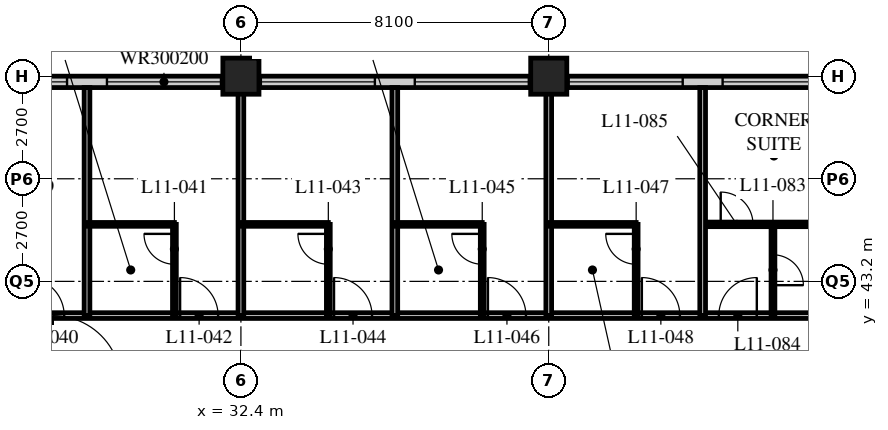
"""IFC4 building model, lengths in metres.
Left out: names, types, materials, properties, quantities, classifications, styles, units other than length and angle.
Written with IfcOpenShell. Run it as: python <this file> out.ifc"""

import sys

from ifc_helpers import new_model, si_unit, direction, frame, frame_2d, origin, origin_2d, place, context, subcontext, project, spatial, rectangle, hollow_rectangle, extrude, element, fill, save


model = new_model("IFC4")
c1 = context("Model", 3, precision=1e-05, world=origin(), true_north=direction((0.0, 1.0)))
c2 = subcontext(c1, "Body", "Model", "MODEL_VIEW")
j1 = project(units=[si_unit("LENGTHUNIT", "METRE"), si_unit("PLANEANGLEUNIT", "RADIAN")], contexts=[c1])
p1 = place(None, origin())
s1 = spatial("IfcSite", under=j1, at=p1, CompositionType="ELEMENT")
p2 = place(p1, origin())
s2 = spatial("IfcBuilding", under=s1, at=p2, CompositionType="ELEMENT")
p3 = place(p2, frame((0.0, 0.0, 50.0)))
s3 = spatial("IfcBuildingStorey", under=s2, at=p3, CompositionType="ELEMENT", Elevation=50.0)
for number, where, z_axis, x_axis in (
    (1, (32.4, 48.6, 0.0), (0.0, 0.0, 1.0), (1.0, 0.0, 0.0)),
    (2, (40.5, 48.6, 0.0), (0.0, 0.0, 1.0), (1.0, 0.0, 0.0)),
):
    element("IfcColumn", number, at=place(p3, frame(where, z_axis=z_axis, x_axis=x_axis)), inside=s3, PredefinedType="COLUMN", context=c2, shape_type="SweptSolid", body=[
        extrude(hollow_rectangle(XDim=0.95, YDim=0.95, WallThickness=0.095, at=origin_2d()), origin(), (0.0, 0.0, 1.0), 3.4),
    ])
p4 = place(p3, frame((48.3, 48.45, 0.0), z_axis=(0.0, 0.0, 1.0), x_axis=(-1.0, 0.0, 0.0)))
e3 = element("IfcWall", 3, at=p4, inside=s3, PredefinedType="SOLIDWALL", context=c2, shape_type="SweptSolid", body=[
    extrude(rectangle(XDim=40.2, YDim=0.3, at=frame_2d((20.1, 0.0))), origin(), (0.0, 0.0, 1.0), 3.19),
])
p5 = place(p4, frame((0.225, 0.0, 0.9)))
e4 = element("IfcOpeningElement", 4, at=p5, cuts=e3, PredefinedType="OPENING", context=c2, shape_type="SweptSolid", body=[
    extrude(rectangle(XDim=3.0, YDim=2.0, at=frame_2d((1.5, 1.0))), frame((0.0, 0.16, 0.0), z_axis=(0.0, -1.0, 0.0), x_axis=(1.0, 0.0, 0.0)), (0.0, 0.0, 1.0), 0.32),
])
p6 = place(p4, frame((4.275, 0.0, 0.9)))
e5 = element("IfcOpeningElement", 5, at=p6, cuts=e3, PredefinedType="OPENING", context=c2, shape_type="SweptSolid", body=[
    extrude(rectangle(XDim=3.0, YDim=2.0, at=frame_2d((1.5, 1.0))), frame((0.0, 0.16, 0.0), z_axis=(0.0, -1.0, 0.0), x_axis=(1.0, 0.0, 0.0)), (0.0, 0.0, 1.0), 0.32),
])
p7 = place(p4, frame((8.325, 0.0, 0.9)))
e6 = element("IfcOpeningElement", 6, at=p7, cuts=e3, PredefinedType="OPENING", context=c2, shape_type="SweptSolid", body=[
    extrude(rectangle(XDim=3.0, YDim=2.0, at=frame_2d((1.5, 1.0))), frame((0.0, 0.16, 0.0), z_axis=(0.0, -1.0, 0.0), x_axis=(1.0, 0.0, 0.0)), (0.0, 0.0, 1.0), 0.32),
])
p8 = place(p4, frame((12.375, 0.0, 0.9)))
e7 = element("IfcOpeningElement", 7, at=p8, cuts=e3, PredefinedType="OPENING", context=c2, shape_type="SweptSolid", body=[
    extrude(rectangle(XDim=3.0, YDim=2.0, at=frame_2d((1.5, 1.0))), frame((0.0, 0.16, 0.0), z_axis=(0.0, -1.0, 0.0), x_axis=(1.0, 0.0, 0.0)), (0.0, 0.0, 1.0), 0.32),
])
p9 = place(p4, frame((16.425, 0.0, 0.9)))
e8 = element("IfcOpeningElement", 8, at=p9, cuts=e3, PredefinedType="OPENING", context=c2, shape_type="SweptSolid", body=[
    extrude(rectangle(XDim=3.0, YDim=2.0, at=frame_2d((1.5, 1.0))), frame((0.0, 0.16, 0.0), z_axis=(0.0, -1.0, 0.0), x_axis=(1.0, 0.0, 0.0)), (0.0, 0.0, 1.0), 0.32),
])
p10 = place(p4, frame((20.475, 0.0, 0.9)))
e9 = element("IfcOpeningElement", 9, at=p10, cuts=e3, PredefinedType="OPENING", context=c2, shape_type="SweptSolid", body=[
    extrude(rectangle(XDim=3.0, YDim=2.0, at=frame_2d((1.5, 1.0))), frame((0.0, 0.16, 0.0), z_axis=(0.0, -1.0, 0.0), x_axis=(1.0, 0.0, 0.0)), (0.0, 0.0, 1.0), 0.32),
])
p11 = place(p4, frame((24.525, 0.0, 0.9)))
e10 = element("IfcOpeningElement", 10, at=p11, cuts=e3, PredefinedType="OPENING", context=c2, shape_type="SweptSolid", body=[
    extrude(rectangle(XDim=3.0, YDim=2.0, at=frame_2d((1.5, 1.0))), frame((0.0, 0.16, 0.0), z_axis=(0.0, -1.0, 0.0), x_axis=(1.0, 0.0, 0.0)), (0.0, 0.0, 1.0), 0.32),
])
p12 = place(p4, frame((28.575, 0.0, 0.9)))
e11 = element("IfcOpeningElement", 11, at=p12, cuts=e3, PredefinedType="OPENING", context=c2, shape_type="SweptSolid", body=[
    extrude(rectangle(XDim=3.0, YDim=2.0, at=frame_2d((1.5, 1.0))), frame((0.0, 0.16, 0.0), z_axis=(0.0, -1.0, 0.0), x_axis=(1.0, 0.0, 0.0)), (0.0, 0.0, 1.0), 0.32),
])
p13 = place(p4, frame((32.625, 0.0, 0.9)))
e12 = element("IfcOpeningElement", 12, at=p13, cuts=e3, PredefinedType="OPENING", context=c2, shape_type="SweptSolid", body=[
    extrude(rectangle(XDim=3.0, YDim=2.0, at=frame_2d((1.5, 1.0))), frame((0.0, 0.16, 0.0), z_axis=(0.0, -1.0, 0.0), x_axis=(1.0, 0.0, 0.0)), (0.0, 0.0, 1.0), 0.32),
])
p14 = place(p4, frame((36.675, 0.0, 0.9)))
e13 = element("IfcOpeningElement", 13, at=p14, cuts=e3, PredefinedType="OPENING", context=c2, shape_type="SweptSolid", body=[
    extrude(rectangle(XDim=3.0, YDim=2.0, at=frame_2d((1.5, 1.0))), frame((0.0, 0.16, 0.0), z_axis=(0.0, -1.0, 0.0), x_axis=(1.0, 0.0, 0.0)), (0.0, 0.0, 1.0), 0.32),
])
p15 = place(p3, frame((8.1, 42.3, 0.0), z_axis=(0.0, 0.0, 1.0), x_axis=(1.0, 0.0, 0.0)))
e14 = element("IfcWall", 14, at=p15, inside=s3, PredefinedType="PARTITIONING", context=c2, shape_type="SweptSolid", body=[
    extrude(rectangle(XDim=40.5, YDim=0.15, at=frame_2d((20.25, 0.0))), origin(), (0.0, 0.0, 1.0), 3.19),
])
p16 = place(p15, frame((6.5, 0.0, 0.0)))
e15 = element("IfcOpeningElement", 15, at=p16, cuts=e14, PredefinedType="OPENING", context=c2, shape_type="SweptSolid", body=[
    extrude(rectangle(XDim=1.0, YDim=2.1, at=frame_2d((0.5, 1.05))), frame((0.0, 0.085, 0.0), z_axis=(0.0, -1.0, 0.0), x_axis=(1.0, 0.0, 0.0)), (0.0, 0.0, 1.0), 0.17),
])
p17 = place(p15, frame((10.55, 0.0, 0.0)))
e16 = element("IfcOpeningElement", 16, at=p17, cuts=e14, PredefinedType="OPENING", context=c2, shape_type="SweptSolid", body=[
    extrude(rectangle(XDim=1.0, YDim=2.1, at=frame_2d((0.5, 1.05))), frame((0.0, 0.085, 0.0), z_axis=(0.0, -1.0, 0.0), x_axis=(1.0, 0.0, 0.0)), (0.0, 0.0, 1.0), 0.17),
])
p18 = place(p15, frame((14.6, 0.0, 0.0)))
e17 = element("IfcOpeningElement", 17, at=p18, cuts=e14, PredefinedType="OPENING", context=c2, shape_type="SweptSolid", body=[
    extrude(rectangle(XDim=1.0, YDim=2.1, at=frame_2d((0.5, 1.05))), frame((0.0, 0.085, 0.0), z_axis=(0.0, -1.0, 0.0), x_axis=(1.0, 0.0, 0.0)), (0.0, 0.0, 1.0), 0.17),
])
p19 = place(p15, frame((18.65, 0.0, 0.0)))
e18 = element("IfcOpeningElement", 18, at=p19, cuts=e14, PredefinedType="OPENING", context=c2, shape_type="SweptSolid", body=[
    extrude(rectangle(XDim=1.0, YDim=2.1, at=frame_2d((0.5, 1.05))), frame((0.0, 0.085, 0.0), z_axis=(0.0, -1.0, 0.0), x_axis=(1.0, 0.0, 0.0)), (0.0, 0.0, 1.0), 0.17),
])
p20 = place(p15, frame((22.7, 0.0, 0.0)))
e19 = element("IfcOpeningElement", 19, at=p20, cuts=e14, PredefinedType="OPENING", context=c2, shape_type="SweptSolid", body=[
    extrude(rectangle(XDim=1.0, YDim=2.1, at=frame_2d((0.5, 1.05))), frame((0.0, 0.085, 0.0), z_axis=(0.0, -1.0, 0.0), x_axis=(1.0, 0.0, 0.0)), (0.0, 0.0, 1.0), 0.17),
])
p21 = place(p15, frame((26.75, 0.0, 0.0)))
e20 = element("IfcOpeningElement", 20, at=p21, cuts=e14, PredefinedType="OPENING", context=c2, shape_type="SweptSolid", body=[
    extrude(rectangle(XDim=1.0, YDim=2.1, at=frame_2d((0.5, 1.05))), frame((0.0, 0.085, 0.0), z_axis=(0.0, -1.0, 0.0), x_axis=(1.0, 0.0, 0.0)), (0.0, 0.0, 1.0), 0.17),
])
p22 = place(p15, frame((30.8, 0.0, 0.0)))
e21 = element("IfcOpeningElement", 21, at=p22, cuts=e14, PredefinedType="OPENING", context=c2, shape_type="SweptSolid", body=[
    extrude(rectangle(XDim=1.0, YDim=2.1, at=frame_2d((0.5, 1.05))), frame((0.0, 0.085, 0.0), z_axis=(0.0, -1.0, 0.0), x_axis=(1.0, 0.0, 0.0)), (0.0, 0.0, 1.0), 0.17),
])
p23 = place(p15, frame((34.85, 0.0, 0.0)))
e22 = element("IfcOpeningElement", 22, at=p23, cuts=e14, PredefinedType="OPENING", context=c2, shape_type="SweptSolid", body=[
    extrude(rectangle(XDim=1.0, YDim=2.1, at=frame_2d((0.5, 1.05))), frame((0.0, 0.085, 0.0), z_axis=(0.0, -1.0, 0.0), x_axis=(1.0, 0.0, 0.0)), (0.0, 0.0, 1.0), 0.17),
])
p24 = place(p15, frame((36.875, 0.0, 0.0)))
e23 = element("IfcOpeningElement", 23, at=p24, cuts=e14, PredefinedType="OPENING", context=c2, shape_type="SweptSolid", body=[
    extrude(rectangle(XDim=1.0, YDim=2.1, at=frame_2d((0.5, 1.05))), frame((0.0, 0.085, 0.0), z_axis=(0.0, -1.0, 0.0), x_axis=(1.0, 0.0, 0.0)), (0.0, 0.0, 1.0), 0.17),
])
p25 = place(p15, frame((2.625, 0.0, 0.0)))
e24 = element("IfcOpeningElement", 24, at=p25, cuts=e14, PredefinedType="OPENING", context=c2, shape_type="SweptSolid", body=[
    extrude(rectangle(XDim=1.0, YDim=2.1, at=frame_2d((0.5, 1.05))), frame((0.0, 0.085, 0.0), z_axis=(0.0, -1.0, 0.0), x_axis=(1.0, 0.0, 0.0)), (0.0, 0.0, 1.0), 0.17),
])
p26 = place(p3, frame((28.35, 42.3, 0.0), z_axis=(0.0, 0.0, 1.0), x_axis=(0.0, 1.0, 0.0)))
e25 = element("IfcWall", 25, at=p26, inside=s3, PredefinedType="PARTITIONING", context=c2, shape_type="SweptSolid", body=[
    extrude(rectangle(XDim=6.0, YDim=0.15, at=frame_2d((3.0, 0.0))), origin(), (0.0, 0.0, 1.0), 3.19),
])
p27 = place(p3, frame((28.35, 44.7, 0.0), z_axis=(0.0, 0.0, 1.0), x_axis=(1.0, 0.0, 0.0)))
e26 = element("IfcWall", 26, at=p27, inside=s3, PredefinedType="PARTITIONING", context=c2, shape_type="SweptSolid", body=[
    extrude(rectangle(XDim=2.3, YDim=0.1, at=frame_2d((1.15, 0.0))), origin(), (0.0, 0.0, 1.0), 3.19),
])
p28 = place(p3, frame((30.65, 42.3, 0.0), z_axis=(0.0, 0.0, 1.0), x_axis=(0.0, 1.0, 0.0)))
e27 = element("IfcWall", 27, at=p28, inside=s3, PredefinedType="PARTITIONING", context=c2, shape_type="SweptSolid", body=[
    extrude(rectangle(XDim=2.4, YDim=0.1, at=frame_2d((1.2, 0.0))), origin(), (0.0, 0.0, 1.0), 3.19),
])
p29 = place(p28, frame((1.35, 0.0, 0.0)))
e28 = element("IfcOpeningElement", 28, at=p29, cuts=e27, PredefinedType="OPENING", context=c2, shape_type="SweptSolid", body=[
    extrude(rectangle(XDim=0.8, YDim=2.1, at=frame_2d((0.4, 1.05))), frame((0.0, 0.06, 0.0), z_axis=(0.0, -1.0, 0.0), x_axis=(1.0, 0.0, 0.0)), (0.0, 0.0, 1.0), 0.12),
])
p30 = place(p3, frame((32.4, 42.3, 0.0), z_axis=(0.0, 0.0, 1.0), x_axis=(0.0, 1.0, 0.0)))
e29 = element("IfcWall", 29, at=p30, inside=s3, PredefinedType="PARTITIONING", context=c2, shape_type="SweptSolid", body=[
    extrude(rectangle(XDim=6.0, YDim=0.15, at=frame_2d((3.0, 0.0))), origin(), (0.0, 0.0, 1.0), 2.578),
])
p31 = place(p3, frame((32.4, 44.7, 0.0), z_axis=(0.0, 0.0, 1.0), x_axis=(1.0, 0.0, 0.0)))
e30 = element("IfcWall", 30, at=p31, inside=s3, PredefinedType="PARTITIONING", context=c2, shape_type="SweptSolid", body=[
    extrude(rectangle(XDim=2.3, YDim=0.1, at=frame_2d((1.15, 0.0))), origin(), (0.0, 0.0, 1.0), 3.19),
])
p32 = place(p3, frame((34.7, 42.3, 0.0), z_axis=(0.0, 0.0, 1.0), x_axis=(0.0, 1.0, 0.0)))
e31 = element("IfcWall", 31, at=p32, inside=s3, PredefinedType="PARTITIONING", context=c2, shape_type="SweptSolid", body=[
    extrude(rectangle(XDim=2.4, YDim=0.1, at=frame_2d((1.2, 0.0))), origin(), (0.0, 0.0, 1.0), 3.19),
])
p33 = place(p32, frame((1.35, 0.0, 0.0)))
e32 = element("IfcOpeningElement", 32, at=p33, cuts=e31, PredefinedType="OPENING", context=c2, shape_type="SweptSolid", body=[
    extrude(rectangle(XDim=0.8, YDim=2.1, at=frame_2d((0.4, 1.05))), frame((0.0, 0.06, 0.0), z_axis=(0.0, -1.0, 0.0), x_axis=(1.0, 0.0, 0.0)), (0.0, 0.0, 1.0), 0.12),
])
p34 = place(p3, frame((36.45, 42.3, 0.0), z_axis=(0.0, 0.0, 1.0), x_axis=(0.0, 1.0, 0.0)))
e33 = element("IfcWall", 33, at=p34, inside=s3, PredefinedType="PARTITIONING", context=c2, shape_type="SweptSolid", body=[
    extrude(rectangle(XDim=6.0, YDim=0.15, at=frame_2d((3.0, 0.0))), origin(), (0.0, 0.0, 1.0), 3.19),
])
p35 = place(p3, frame((36.45, 44.7, 0.0), z_axis=(0.0, 0.0, 1.0), x_axis=(1.0, 0.0, 0.0)))
e34 = element("IfcWall", 34, at=p35, inside=s3, PredefinedType="PARTITIONING", context=c2, shape_type="SweptSolid", body=[
    extrude(rectangle(XDim=2.3, YDim=0.1, at=frame_2d((1.15, 0.0))), origin(), (0.0, 0.0, 1.0), 3.19),
])
p36 = place(p3, frame((38.75, 42.3, 0.0), z_axis=(0.0, 0.0, 1.0), x_axis=(0.0, 1.0, 0.0)))
e35 = element("IfcWall", 35, at=p36, inside=s3, PredefinedType="PARTITIONING", context=c2, shape_type="SweptSolid", body=[
    extrude(rectangle(XDim=2.4, YDim=0.1, at=frame_2d((1.2, 0.0))), origin(), (0.0, 0.0, 1.0), 3.19),
])
p37 = place(p36, frame((1.35, 0.0, 0.0)))
e36 = element("IfcOpeningElement", 36, at=p37, cuts=e35, PredefinedType="OPENING", context=c2, shape_type="SweptSolid", body=[
    extrude(rectangle(XDim=0.8, YDim=2.1, at=frame_2d((0.4, 1.05))), frame((0.0, 0.06, 0.0), z_axis=(0.0, -1.0, 0.0), x_axis=(1.0, 0.0, 0.0)), (0.0, 0.0, 1.0), 0.12),
])
p38 = place(p3, frame((40.5, 42.3, 0.0), z_axis=(0.0, 0.0, 1.0), x_axis=(0.0, 1.0, 0.0)))
e37 = element("IfcWall", 37, at=p38, inside=s3, PredefinedType="PARTITIONING", context=c2, shape_type="SweptSolid", body=[
    extrude(rectangle(XDim=6.0, YDim=0.15, at=frame_2d((3.0, 0.0))), origin(), (0.0, 0.0, 1.0), 2.578),
])
p39 = place(p3, frame((40.5, 44.7, 0.0), z_axis=(0.0, 0.0, 1.0), x_axis=(1.0, 0.0, 0.0)))
e38 = element("IfcWall", 38, at=p39, inside=s3, PredefinedType="PARTITIONING", context=c2, shape_type="SweptSolid", body=[
    extrude(rectangle(XDim=2.3, YDim=0.1, at=frame_2d((1.15, 0.0))), origin(), (0.0, 0.0, 1.0), 3.19),
])
p40 = place(p3, frame((42.8, 42.3, 0.0), z_axis=(0.0, 0.0, 1.0), x_axis=(0.0, 1.0, 0.0)))
e39 = element("IfcWall", 39, at=p40, inside=s3, PredefinedType="PARTITIONING", context=c2, shape_type="SweptSolid", body=[
    extrude(rectangle(XDim=2.4, YDim=0.1, at=frame_2d((1.2, 0.0))), origin(), (0.0, 0.0, 1.0), 3.19),
])
p41 = place(p40, frame((1.35, 0.0, 0.0)))
e40 = element("IfcOpeningElement", 40, at=p41, cuts=e39, PredefinedType="OPENING", context=c2, shape_type="SweptSolid", body=[
    extrude(rectangle(XDim=0.8, YDim=2.1, at=frame_2d((0.4, 1.05))), frame((0.0, 0.06, 0.0), z_axis=(0.0, -1.0, 0.0), x_axis=(1.0, 0.0, 0.0)), (0.0, 0.0, 1.0), 0.12),
])
p42 = place(p3, frame((44.55, 44.7, 0.0), z_axis=(0.0, 0.0, 1.0), x_axis=(1.0, 0.0, 0.0)))
e41 = element("IfcWall", 41, at=p42, inside=s3, PredefinedType="PARTITIONING", context=c2, shape_type="SweptSolid", body=[
    extrude(rectangle(XDim=4.05, YDim=0.12, at=frame_2d((2.025, 0.0))), origin(), (0.0, 0.0, 1.0), 3.19),
])
p43 = place(p42, frame((0.475, 0.0, 0.0)))
e42 = element("IfcOpeningElement", 42, at=p43, cuts=e41, PredefinedType="OPENING", context=c2, shape_type="SweptSolid", body=[
    extrude(rectangle(XDim=0.85, YDim=2.1, at=frame_2d((0.425, 1.05))), frame((0.0, 0.07, 0.0), z_axis=(0.0, -1.0, 0.0), x_axis=(1.0, 0.0, 0.0)), (0.0, 0.0, 1.0), 0.14),
])
p44 = place(p3, frame((46.4, 42.3, 0.0), z_axis=(0.0, 0.0, 1.0), x_axis=(0.0, 1.0, 0.0)))
e43 = element("IfcWall", 43, at=p44, inside=s3, PredefinedType="PARTITIONING", context=c2, shape_type="SweptSolid", body=[
    extrude(rectangle(XDim=2.4, YDim=0.1, at=frame_2d((1.2, 0.0))), origin(), (0.0, 0.0, 1.0), 3.19),
])
p45 = place(p44, frame((0.8, 0.0, 0.0)))
e44 = element("IfcOpeningElement", 44, at=p45, cuts=e43, PredefinedType="OPENING", context=c2, shape_type="SweptSolid", body=[
    extrude(rectangle(XDim=0.8, YDim=2.1, at=frame_2d((0.4, 1.05))), frame((0.0, 0.06, 0.0), z_axis=(0.0, -1.0, 0.0), x_axis=(1.0, 0.0, 0.0)), (0.0, 0.0, 1.0), 0.12),
])
p46 = place(p3, frame((44.55, 42.3, 0.0), z_axis=(0.0, 0.0, 1.0), x_axis=(0.0, 1.0, 0.0)))
e45 = element("IfcWall", 45, at=p46, inside=s3, PredefinedType="PARTITIONING", context=c2, shape_type="SweptSolid", body=[
    extrude(rectangle(XDim=6.0, YDim=0.15, at=frame_2d((3.0, 0.0))), origin(), (0.0, 0.0, 1.0), 3.19),
])
p47 = place(p5, origin())
e46 = element("IfcWindow", 46, at=p47, inside=s3, PartitioningType="SINGLE_PANEL", PredefinedType="WINDOW", context=c2, shape_type="SweptSolid", body=[
    extrude(rectangle(XDim=3.0, YDim=2.0, at=frame_2d((1.5, 1.0))), frame((0.0, 0.03, 0.0), z_axis=(0.0, -1.0, 0.0), x_axis=(1.0, 0.0, 0.0)), (0.0, 0.0, 1.0), 0.06),
])
fill(e4, e46)
p48 = place(p6, origin())
e47 = element("IfcWindow", 47, at=p48, inside=s3, PartitioningType="SINGLE_PANEL", PredefinedType="WINDOW", context=c2, shape_type="SweptSolid", body=[
    extrude(rectangle(XDim=3.0, YDim=2.0, at=frame_2d((1.5, 1.0))), frame((0.0, 0.03, 0.0), z_axis=(0.0, -1.0, 0.0), x_axis=(1.0, 0.0, 0.0)), (0.0, 0.0, 1.0), 0.06),
])
fill(e5, e47)
p49 = place(p7, origin())
e48 = element("IfcWindow", 48, at=p49, inside=s3, PartitioningType="SINGLE_PANEL", PredefinedType="WINDOW", context=c2, shape_type="SweptSolid", body=[
    extrude(rectangle(XDim=3.0, YDim=2.0, at=frame_2d((1.5, 1.0))), frame((0.0, 0.03, 0.0), z_axis=(0.0, -1.0, 0.0), x_axis=(1.0, 0.0, 0.0)), (0.0, 0.0, 1.0), 0.06),
])
fill(e6, e48)
p50 = place(p8, origin())
e49 = element("IfcWindow", 49, at=p50, inside=s3, PartitioningType="SINGLE_PANEL", PredefinedType="WINDOW", context=c2, shape_type="SweptSolid", body=[
    extrude(rectangle(XDim=3.0, YDim=2.0, at=frame_2d((1.5, 1.0))), frame((0.0, 0.03, 0.0), z_axis=(0.0, -1.0, 0.0), x_axis=(1.0, 0.0, 0.0)), (0.0, 0.0, 1.0), 0.06),
])
fill(e7, e49)
p51 = place(p9, origin())
e50 = element("IfcWindow", 50, at=p51, inside=s3, PartitioningType="SINGLE_PANEL", PredefinedType="WINDOW", context=c2, shape_type="SweptSolid", body=[
    extrude(rectangle(XDim=3.0, YDim=2.0, at=frame_2d((1.5, 1.0))), frame((0.0, 0.03, 0.0), z_axis=(0.0, -1.0, 0.0), x_axis=(1.0, 0.0, 0.0)), (0.0, 0.0, 1.0), 0.06),
])
fill(e8, e50)
p52 = place(p10, origin())
e51 = element("IfcWindow", 51, at=p52, inside=s3, PartitioningType="SINGLE_PANEL", PredefinedType="WINDOW", context=c2, shape_type="SweptSolid", body=[
    extrude(rectangle(XDim=3.0, YDim=2.0, at=frame_2d((1.5, 1.0))), frame((0.0, 0.03, 0.0), z_axis=(0.0, -1.0, 0.0), x_axis=(1.0, 0.0, 0.0)), (0.0, 0.0, 1.0), 0.06),
])
fill(e9, e51)
p53 = place(p19, origin())
e52 = element("IfcDoor", 52, at=p53, inside=s3, OperationType="SINGLE_SWING_LEFT", PredefinedType="DOOR", context=c2, shape_type="SweptSolid", body=[
    extrude(rectangle(XDim=1.0, YDim=2.1, at=frame_2d((0.5, 1.05))), frame((0.0, 0.025, 0.0), z_axis=(0.0, -1.0, 0.0), x_axis=(1.0, 0.0, 0.0)), (0.0, 0.0, 1.0), 0.05),
])
fill(e18, e52)
p54 = place(p29, origin())
e53 = element("IfcDoor", 53, at=p54, inside=s3, OperationType="SINGLE_SWING_RIGHT", PredefinedType="DOOR", context=c2, shape_type="SweptSolid", body=[
    extrude(rectangle(XDim=0.8, YDim=2.1, at=frame_2d((0.4, 1.05))), frame((0.0, 0.025, 0.0), z_axis=(0.0, -1.0, 0.0), x_axis=(1.0, 0.0, 0.0)), (0.0, 0.0, 1.0), 0.05),
])
fill(e28, e53)
p55 = place(p20, origin())
e54 = element("IfcDoor", 54, at=p55, inside=s3, OperationType="SINGLE_SWING_LEFT", PredefinedType="DOOR", context=c2, shape_type="SweptSolid", body=[
    extrude(rectangle(XDim=1.0, YDim=2.1, at=frame_2d((0.5, 1.05))), frame((0.0, 0.025, 0.0), z_axis=(0.0, -1.0, 0.0), x_axis=(1.0, 0.0, 0.0)), (0.0, 0.0, 1.0), 0.05),
])
fill(e19, e54)
p56 = place(p33, origin())
e55 = element("IfcDoor", 55, at=p56, inside=s3, OperationType="SINGLE_SWING_RIGHT", PredefinedType="DOOR", context=c2, shape_type="SweptSolid", body=[
    extrude(rectangle(XDim=0.8, YDim=2.1, at=frame_2d((0.4, 1.05))), frame((0.0, 0.025, 0.0), z_axis=(0.0, -1.0, 0.0), x_axis=(1.0, 0.0, 0.0)), (0.0, 0.0, 1.0), 0.05),
])
fill(e32, e55)
p57 = place(p21, origin())
e56 = element("IfcDoor", 56, at=p57, inside=s3, OperationType="SINGLE_SWING_LEFT", PredefinedType="DOOR", context=c2, shape_type="SweptSolid", body=[
    extrude(rectangle(XDim=1.0, YDim=2.1, at=frame_2d((0.5, 1.05))), frame((0.0, 0.025, 0.0), z_axis=(0.0, -1.0, 0.0), x_axis=(1.0, 0.0, 0.0)), (0.0, 0.0, 1.0), 0.05),
])
fill(e20, e56)
p58 = place(p37, origin())
e57 = element("IfcDoor", 57, at=p58, inside=s3, OperationType="SINGLE_SWING_RIGHT", PredefinedType="DOOR", context=c2, shape_type="SweptSolid", body=[
    extrude(rectangle(XDim=0.8, YDim=2.1, at=frame_2d((0.4, 1.05))), frame((0.0, 0.025, 0.0), z_axis=(0.0, -1.0, 0.0), x_axis=(1.0, 0.0, 0.0)), (0.0, 0.0, 1.0), 0.05),
])
fill(e36, e57)
p59 = place(p22, origin())
e58 = element("IfcDoor", 58, at=p59, inside=s3, OperationType="SINGLE_SWING_LEFT", PredefinedType="DOOR", context=c2, shape_type="SweptSolid", body=[
    extrude(rectangle(XDim=1.0, YDim=2.1, at=frame_2d((0.5, 1.05))), frame((0.0, 0.025, 0.0), z_axis=(0.0, -1.0, 0.0), x_axis=(1.0, 0.0, 0.0)), (0.0, 0.0, 1.0), 0.05),
])
fill(e21, e58)
p60 = place(p41, origin())
e59 = element("IfcDoor", 59, at=p60, inside=s3, OperationType="SINGLE_SWING_RIGHT", PredefinedType="DOOR", context=c2, shape_type="SweptSolid", body=[
    extrude(rectangle(XDim=0.8, YDim=2.1, at=frame_2d((0.4, 1.05))), frame((0.0, 0.025, 0.0), z_axis=(0.0, -1.0, 0.0), x_axis=(1.0, 0.0, 0.0)), (0.0, 0.0, 1.0), 0.05),
])
fill(e40, e59)
p61 = place(p23, origin())
e60 = element("IfcDoor", 60, at=p61, inside=s3, OperationType="SINGLE_SWING_LEFT", PredefinedType="DOOR", context=c2, shape_type="SweptSolid", body=[
    extrude(rectangle(XDim=1.0, YDim=2.1, at=frame_2d((0.5, 1.05))), frame((0.0, 0.025, 0.0), z_axis=(0.0, -1.0, 0.0), x_axis=(1.0, 0.0, 0.0)), (0.0, 0.0, 1.0), 0.05),
])
fill(e22, e60)
p62 = place(p45, origin())
e61 = element("IfcDoor", 61, at=p62, inside=s3, OperationType="SINGLE_SWING_RIGHT", PredefinedType="DOOR", context=c2, shape_type="SweptSolid", body=[
    extrude(rectangle(XDim=0.8, YDim=2.1, at=frame_2d((0.4, 1.05))), frame((0.0, 0.025, 0.0), z_axis=(0.0, -1.0, 0.0), x_axis=(1.0, 0.0, 0.0)), (0.0, 0.0, 1.0), 0.05),
])
fill(e44, e61)
p63 = place(p24, origin())
e62 = element("IfcDoor", 62, at=p63, inside=s3, OperationType="SINGLE_SWING_RIGHT", PredefinedType="DOOR", context=c2, shape_type="SweptSolid", body=[
    extrude(rectangle(XDim=1.0, YDim=2.1, at=frame_2d((0.5, 1.05))), frame((0.0, 0.025, 0.0), z_axis=(0.0, -1.0, 0.0), x_axis=(1.0, 0.0, 0.0)), (0.0, 0.0, 1.0), 0.05),
])
fill(e23, e62)
p64 = place(p43, origin())
e63 = element("IfcDoor", 63, at=p64, inside=s3, OperationType="SINGLE_SWING_LEFT", PredefinedType="DOOR", context=c2, shape_type="SweptSolid", body=[
    extrude(rectangle(XDim=0.85, YDim=2.1, at=frame_2d((0.425, 1.05))), frame((0.0, 0.025, 0.0), z_axis=(0.0, -1.0, 0.0), x_axis=(1.0, 0.0, 0.0)), (0.0, 0.0, 1.0), 0.05),
])
fill(e42, e63)
save(model, sys.argv[1])
